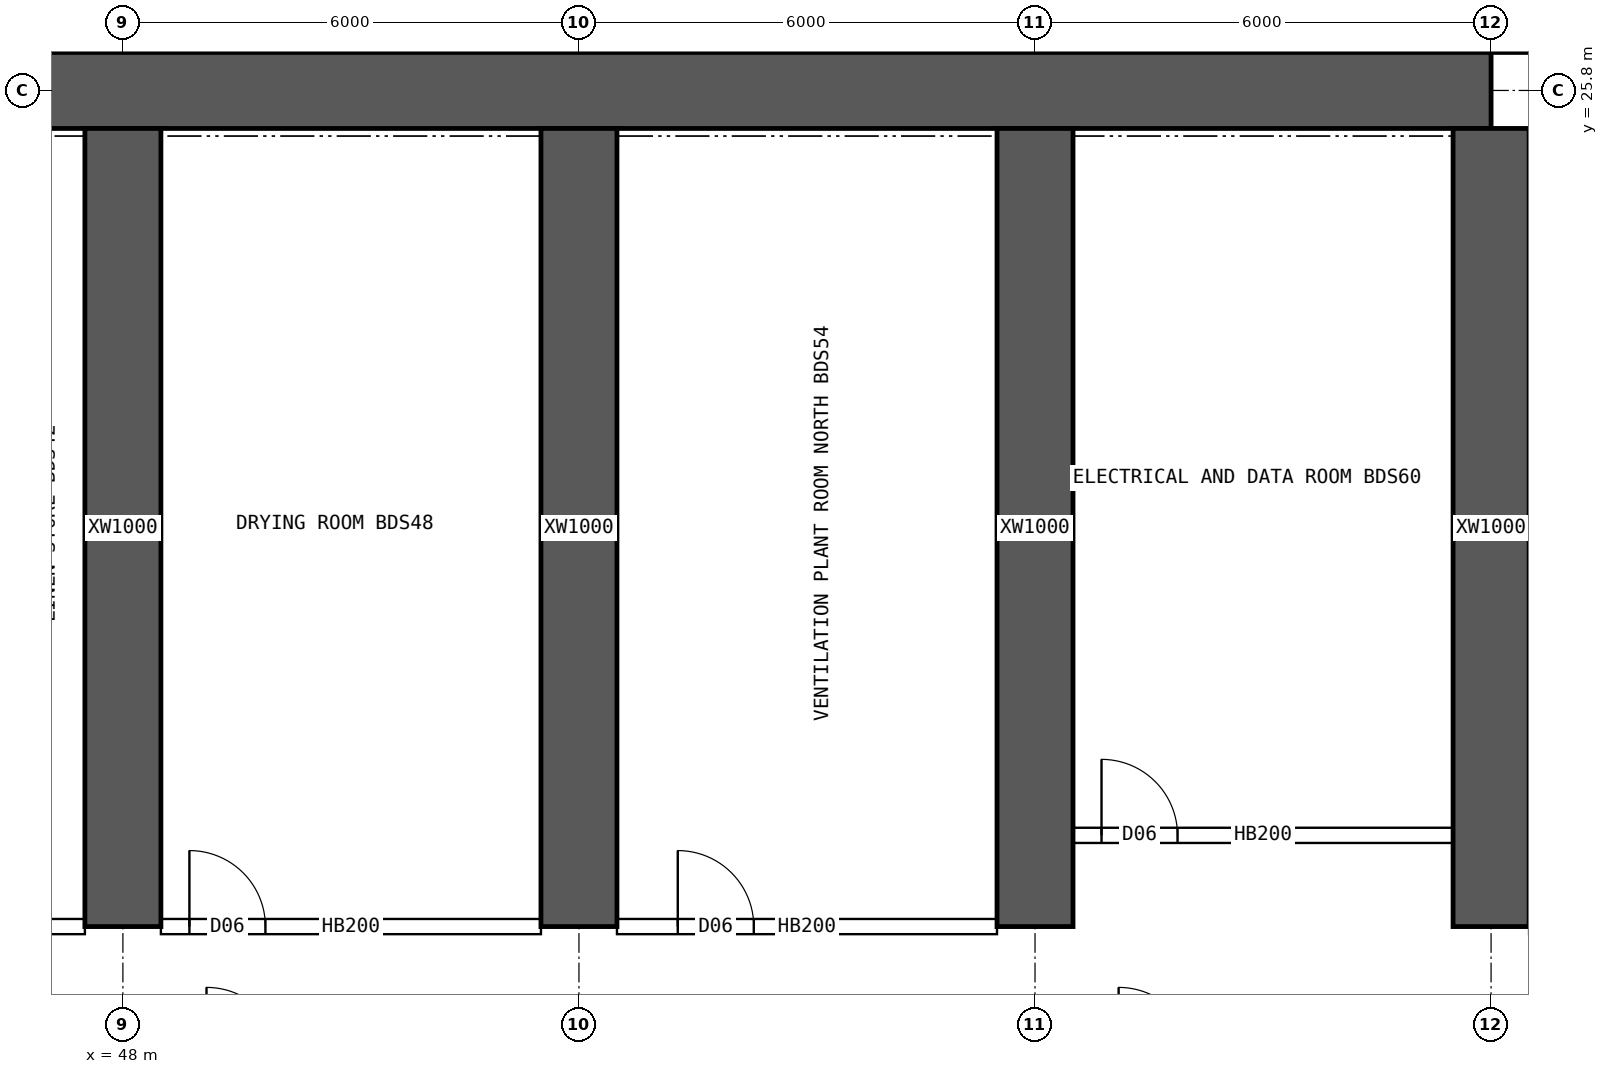
"""IFC4 building model, lengths in metres.
Left out: names, types, materials, properties, quantities, classifications, styles, units other than length and angle.
Written with IfcOpenShell. Run it as: python <this file> out.ifc"""

import sys

from ifc_helpers import new_model, si_unit, direction, frame, frame_2d, origin, place, context, subcontext, project, spatial, rectangle, extrude, element, fill, save


model = new_model("IFC4")
c1 = context("Model", 3, precision=1e-05, world=origin(), true_north=direction((0.0, 1.0)))
c2 = subcontext(c1, "Body", "Model", "MODEL_VIEW")
j1 = project(units=[si_unit("LENGTHUNIT", "METRE"), si_unit("PLANEANGLEUNIT", "RADIAN")], contexts=[c1])
p1 = place(None, origin())
s1 = spatial("IfcSite", under=j1, at=p1, CompositionType="ELEMENT")
p2 = place(p1, origin())
s2 = spatial("IfcBuilding", under=s1, at=p2, CompositionType="ELEMENT")
p3 = place(p2, frame((0.0, 0.0, 50.2)))
s3 = spatial("IfcBuildingStorey", under=s2, at=p3, CompositionType="ELEMENT", Elevation=50.2)
p4 = place(p3, frame((18.0, 25.8, 0.0), z_axis=(0.0, 0.0, 1.0), x_axis=(1.0, 0.0, 0.0)))
e1 = element("IfcWall", 1, at=p4, inside=s3, PredefinedType="SHEAR", context=c2, shape_type="SweptSolid", body=[
    extrude(rectangle(XDim=48.0, YDim=1.0, at=frame_2d((24.0, 0.0))), origin(), (0.0, 0.0, 1.0), 3.75),
])
for number, where, z_axis, x_axis in (
    (2, (48.0, 14.8, 0.0), (0.0, 0.0, 1.0), (0.0, 1.0, 0.0)),
    (3, (54.0, 14.8, 0.0), (0.0, 0.0, 1.0), (0.0, 1.0, 0.0)),
    (4, (60.0, 14.8, 0.0), (0.0, 0.0, 1.0), (0.0, 1.0, 0.0)),
    (5, (66.0, 14.8, 0.0), (0.0, 0.0, 1.0), (0.0, 1.0, 0.0)),
):
    element("IfcWall", number, at=place(p3, frame(where, z_axis=z_axis, x_axis=x_axis)), inside=s3, PredefinedType="SHEAR", context=c2, shape_type="SweptSolid", body=[
        extrude(rectangle(XDim=10.5, YDim=1.0, at=frame_2d((5.25, 0.0))), origin(), (0.0, 0.0, 1.0), 3.75),
    ])
p5 = place(p3, frame((42.5, 14.8, 0.0), z_axis=(0.0, 0.0, 1.0), x_axis=(1.0, 0.0, 0.0)))
e6 = element("IfcWall", 6, at=p5, inside=s3, PredefinedType="SOLIDWALL", context=c2, shape_type="SweptSolid", body=[
    extrude(rectangle(XDim=5.0, YDim=0.2, at=frame_2d((2.5, 0.0))), origin(), (0.0, 0.0, 1.0), 3.3),
])
p6 = place(p5, frame((0.35, 0.0, 0.0)))
e7 = element("IfcOpeningElement", 7, at=p6, cuts=e6, PredefinedType="OPENING", context=c2, shape_type="SweptSolid", body=[
    extrude(rectangle(XDim=0.9, YDim=2.1, at=frame_2d((0.45, 1.05))), frame((0.0, 0.11, 0.0), z_axis=(0.0, -1.0, 0.0), x_axis=(1.0, 0.0, 0.0)), (0.0, 0.0, 1.0), 0.22),
])
p7 = place(p5, frame((3.405, 0.0, 0.0)))
e8 = element("IfcOpeningElement", 8, at=p7, cuts=e6, PredefinedType="OPENING", context=c2, shape_type="SweptSolid", body=[
    extrude(rectangle(XDim=0.9, YDim=2.1, at=frame_2d((0.45, 1.05))), frame((0.0, 0.11, 0.0), z_axis=(0.0, -1.0, 0.0), x_axis=(1.0, 0.0, 0.0)), (0.0, 0.0, 1.0), 0.22),
])
p8 = place(p3, frame((48.5, 14.8, 0.0), z_axis=(0.0, 0.0, 1.0), x_axis=(1.0, 0.0, 0.0)))
e9 = element("IfcWall", 9, at=p8, inside=s3, PredefinedType="SOLIDWALL", context=c2, shape_type="SweptSolid", body=[
    extrude(rectangle(XDim=5.0, YDim=0.2, at=frame_2d((2.5, 0.0))), origin(), (0.0, 0.0, 1.0), 3.3),
])
p9 = place(p8, frame((0.375, 0.0, 0.0)))
e10 = element("IfcOpeningElement", 10, at=p9, cuts=e9, PredefinedType="OPENING", context=c2, shape_type="SweptSolid", body=[
    extrude(rectangle(XDim=1.0, YDim=2.1, at=frame_2d((0.5, 1.05))), frame((0.0, 0.11, 0.0), z_axis=(0.0, -1.0, 0.0), x_axis=(1.0, 0.0, 0.0)), (0.0, 0.0, 1.0), 0.22),
])
p10 = place(p3, frame((54.5, 14.8, 0.0), z_axis=(0.0, 0.0, 1.0), x_axis=(1.0, 0.0, 0.0)))
e11 = element("IfcWall", 11, at=p10, inside=s3, PredefinedType="SOLIDWALL", context=c2, shape_type="SweptSolid", body=[
    extrude(rectangle(XDim=5.0, YDim=0.2, at=frame_2d((2.5, 0.0))), origin(), (0.0, 0.0, 1.0), 3.3),
])
p11 = place(p10, frame((0.8, 0.0, 0.0)))
e12 = element("IfcOpeningElement", 12, at=p11, cuts=e11, PredefinedType="OPENING", context=c2, shape_type="SweptSolid", body=[
    extrude(rectangle(XDim=1.0, YDim=2.1, at=frame_2d((0.5, 1.05))), frame((0.0, 0.11, 0.0), z_axis=(0.0, -1.0, 0.0), x_axis=(1.0, 0.0, 0.0)), (0.0, 0.0, 1.0), 0.22),
])
p12 = place(p3, frame((60.5, 16.0, 0.0), z_axis=(0.0, 0.0, 1.0), x_axis=(1.0, 0.0, 0.0)))
e13 = element("IfcWall", 13, at=p12, inside=s3, PredefinedType="SOLIDWALL", context=c2, shape_type="SweptSolid", body=[
    extrude(rectangle(XDim=5.0, YDim=0.2, at=frame_2d((2.5, 0.0))), origin(), (0.0, 0.0, 1.0), 3.3),
])
p13 = place(p12, frame((0.375, 0.0, 0.0)))
e14 = element("IfcOpeningElement", 14, at=p13, cuts=e13, PredefinedType="OPENING", context=c2, shape_type="SweptSolid", body=[
    extrude(rectangle(XDim=1.0, YDim=2.1, at=frame_2d((0.5, 1.05))), frame((0.0, 0.11, 0.0), z_axis=(0.0, -1.0, 0.0), x_axis=(1.0, 0.0, 0.0)), (0.0, 0.0, 1.0), 0.22),
])
p14 = place(p9, origin())
e15 = element("IfcDoor", 15, at=p14, inside=s3, OperationType="SINGLE_SWING_LEFT", PredefinedType="DOOR", context=c2, shape_type="SweptSolid", body=[
    extrude(rectangle(XDim=1.0, YDim=2.1, at=frame_2d((0.5, 1.05))), frame((0.0, 0.025, 0.0), z_axis=(0.0, -1.0, 0.0), x_axis=(1.0, 0.0, 0.0)), (0.0, 0.0, 1.0), 0.05),
])
fill(e10, e15)
p15 = place(p11, origin())
e16 = element("IfcDoor", 16, at=p15, inside=s3, OperationType="SINGLE_SWING_LEFT", PredefinedType="DOOR", context=c2, shape_type="SweptSolid", body=[
    extrude(rectangle(XDim=1.0, YDim=2.1, at=frame_2d((0.5, 1.05))), frame((0.0, 0.025, 0.0), z_axis=(0.0, -1.0, 0.0), x_axis=(1.0, 0.0, 0.0)), (0.0, 0.0, 1.0), 0.05),
])
fill(e12, e16)
p16 = place(p13, origin())
e17 = element("IfcDoor", 17, at=p16, inside=s3, OperationType="SINGLE_SWING_LEFT", PredefinedType="DOOR", context=c2, shape_type="SweptSolid", body=[
    extrude(rectangle(XDim=1.0, YDim=2.1, at=frame_2d((0.5, 1.05))), frame((0.0, 0.025, 0.0), z_axis=(0.0, -1.0, 0.0), x_axis=(1.0, 0.0, 0.0)), (0.0, 0.0, 1.0), 0.05),
])
fill(e14, e17)
save(model, sys.argv[1])
